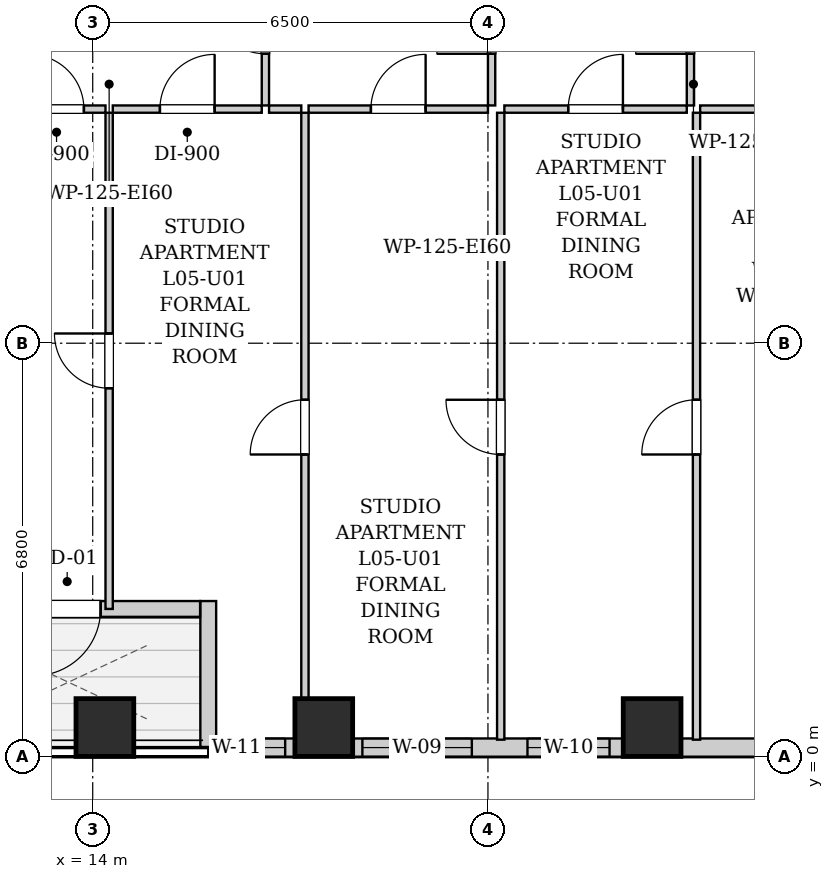
"""IFC4 building model, lengths in metres.
Left out: names, types, materials, properties, quantities, classifications, styles, units other than length and angle.
Written with IfcOpenShell. Run it as: python <this file> out.ifc"""

import sys

from ifc_helpers import new_model, si_unit, direction, frame, frame_2d, origin, origin_2d, place, context, subcontext, project, spatial, rectangle, extrude, element, fill, save


model = new_model("IFC4")
c1 = context("Model", 3, precision=1e-05, world=origin(), true_north=direction((0.0, 1.0)))
c2 = subcontext(c1, "Body", "Model", "MODEL_VIEW")
j1 = project(units=[si_unit("LENGTHUNIT", "METRE"), si_unit("PLANEANGLEUNIT", "RADIAN")], contexts=[c1])
p1 = place(None, origin())
s1 = spatial("IfcSite", under=j1, at=p1, CompositionType="ELEMENT")
p2 = place(p1, origin())
s2 = spatial("IfcBuilding", under=s1, at=p2, CompositionType="ELEMENT")
p3 = place(p2, frame((0.0, 0.0, 25.8)))
s3 = spatial("IfcBuildingStorey", under=s2, at=p3, CompositionType="ELEMENT", Elevation=25.8)
for number, where, z_axis, x_axis in (
    (1, (14.2, 0.48, 0.0), (0.0, 0.0, 1.0), (1.0, 0.0, 0.0)),
    (2, (17.8, 0.48, 0.0), (0.0, 0.0, 1.0), (1.0, 0.0, 0.0)),
    (3, (23.2, 0.48, 0.0), (0.0, 0.0, 1.0), (1.0, 0.0, 0.0)),
):
    element("IfcColumn", number, at=place(p3, frame(where, z_axis=z_axis, x_axis=x_axis)), inside=s3, PredefinedType="COLUMN", context=c2, shape_type="SweptSolid", body=[
        extrude(rectangle(XDim=0.95, YDim=0.95, at=origin_2d()), origin(), (0.0, 0.0, 1.0), 3.2),
    ])
p4 = place(p3, frame((44.0, 0.15, 0.0), z_axis=(0.0, 0.0, 1.0), x_axis=(-1.0, 0.0, 0.0)))
e4 = element("IfcWall", 4, at=p4, inside=s3, PredefinedType="SOLIDWALL", context=c2, shape_type="SweptSolid", body=[
    extrude(rectangle(XDim=28.1, YDim=0.3, at=frame_2d((14.05, 0.0))), origin(), (0.0, 0.0, 1.0), 1.975),
])
p5 = place(p4, frame((26.835, 0.0, 0.55)))
e5 = element("IfcOpeningElement", 5, at=p5, cuts=e4, PredefinedType="OPENING", context=c2, shape_type="SweptSolid", body=[
    extrude(rectangle(XDim=0.85, YDim=1.2, at=frame_2d((0.425, 0.6))), frame((0.0, 0.16, 0.0), z_axis=(0.0, -1.0, 0.0), x_axis=(1.0, 0.0, 0.0)), (0.0, 0.0, 1.0), 0.32),
])
p6 = place(p4, frame((23.765, 0.0, 0.55)))
e6 = element("IfcOpeningElement", 6, at=p6, cuts=e4, PredefinedType="OPENING", context=c2, shape_type="SweptSolid", body=[
    extrude(rectangle(XDim=1.8, YDim=1.2, at=frame_2d((0.9, 0.6))), frame((0.0, 0.16, 0.0), z_axis=(0.0, -1.0, 0.0), x_axis=(1.0, 0.0, 0.0)), (0.0, 0.0, 1.0), 0.32),
])
p7 = place(p4, frame((21.5, 0.0, 0.55)))
e7 = element("IfcOpeningElement", 7, at=p7, cuts=e4, PredefinedType="OPENING", context=c2, shape_type="SweptSolid", body=[
    extrude(rectangle(XDim=1.35, YDim=1.2, at=frame_2d((0.675, 0.6))), frame((0.0, 0.16, 0.0), z_axis=(0.0, -1.0, 0.0), x_axis=(1.0, 0.0, 0.0)), (0.0, 0.0, 1.0), 0.32),
])
p8 = place(p4, frame((14.352, 0.0, 0.55)))
e8 = element("IfcOpeningElement", 8, at=p8, cuts=e4, PredefinedType="OPENING", context=c2, shape_type="SweptSolid", body=[
    extrude(rectangle(XDim=1.8, YDim=1.2, at=frame_2d((0.9, 0.6))), frame((0.0, 0.16, 0.0), z_axis=(0.0, -1.0, 0.0), x_axis=(1.0, 0.0, 0.0)), (0.0, 0.0, 1.0), 0.32),
])
p9 = place(p4, frame((11.435, 0.0, 0.55)))
e9 = element("IfcOpeningElement", 9, at=p9, cuts=e4, PredefinedType="OPENING", context=c2, shape_type="SweptSolid", body=[
    extrude(rectangle(XDim=1.8, YDim=1.2, at=frame_2d((0.9, 0.6))), frame((0.0, 0.16, 0.0), z_axis=(0.0, -1.0, 0.0), x_axis=(1.0, 0.0, 0.0)), (0.0, 0.0, 1.0), 0.32),
])
p10 = place(p4, frame((7.891, 0.0, 0.55)))
e10 = element("IfcOpeningElement", 10, at=p10, cuts=e4, PredefinedType="OPENING", context=c2, shape_type="SweptSolid", body=[
    extrude(rectangle(XDim=1.8, YDim=1.2, at=frame_2d((0.9, 0.6))), frame((0.0, 0.16, 0.0), z_axis=(0.0, -1.0, 0.0), x_axis=(1.0, 0.0, 0.0)), (0.0, 0.0, 1.0), 0.32),
])
p11 = place(p4, frame((4.315, 0.0, 0.55)))
e11 = element("IfcOpeningElement", 11, at=p11, cuts=e4, PredefinedType="OPENING", context=c2, shape_type="SweptSolid", body=[
    extrude(rectangle(XDim=0.85, YDim=1.2, at=frame_2d((0.425, 0.6))), frame((0.0, 0.16, 0.0), z_axis=(0.0, -1.0, 0.0), x_axis=(1.0, 0.0, 0.0)), (0.0, 0.0, 1.0), 0.32),
])
p12 = place(p3, frame((15.9, 0.16, 0.0), z_axis=(0.0, 0.0, 1.0), x_axis=(0.0, 1.0, 0.0)))
e12 = element("IfcWall", 12, at=p12, inside=s3, PredefinedType="SOLIDWALL", context=c2, shape_type="SweptSolid", body=[
    extrude(rectangle(XDim=2.4, YDim=0.26, at=frame_2d((1.2, 0.0))), origin(), (0.0, 0.0, 1.0), 2.94),
])
p13 = place(p3, frame((15.766, 2.43, 0.0), z_axis=(0.0, 0.0, 1.0), x_axis=(-1.0, 0.0, 0.0)))
e13 = element("IfcWall", 13, at=p13, inside=s3, PredefinedType="SOLIDWALL", context=c2, shape_type="SweptSolid", body=[
    extrude(rectangle(XDim=4.332, YDim=0.26, at=frame_2d((2.166, 0.0))), origin(), (0.0, 0.0, 1.0), 2.94),
])
p14 = place(p13, frame((1.636, 0.0, 0.0)))
e14 = element("IfcOpeningElement", 14, at=p14, cuts=e13, PredefinedType="OPENING", context=c2, shape_type="SweptSolid", body=[
    extrude(rectangle(XDim=1.1, YDim=2.0, at=frame_2d((0.55, 1.0))), frame((0.0, 0.14, 0.0), z_axis=(0.0, -1.0, 0.0), x_axis=(1.0, 0.0, 0.0)), (0.0, 0.0, 1.0), 0.28),
])
p15 = place(p13, frame((2.896, 0.0, 0.55)))
e15 = element("IfcOpeningElement", 15, at=p15, cuts=e13, PredefinedType="OPENING", context=c2, shape_type="SweptSolid", body=[
    extrude(rectangle(XDim=0.85, YDim=1.2, at=frame_2d((0.425, 0.6))), frame((0.0, 0.14, 0.0), z_axis=(0.0, -1.0, 0.0), x_axis=(1.0, 0.0, 0.0)), (0.0, 0.0, 1.0), 0.28),
])
p16 = place(p3, frame((16.84, 10.71, 0.0), z_axis=(0.0, 0.0, 1.0), x_axis=(0.0, 1.0, 0.0)))
e16 = element("IfcWall", 16, at=p16, inside=s3, PredefinedType="PARTITIONING", context=c2, shape_type="SweptSolid", body=[
    extrude(rectangle(XDim=2.6, YDim=0.12, at=frame_2d((1.3, 0.0))), origin(), (0.0, 0.0, 1.0), 2.94),
])
p17 = place(p16, frame((0.85, 0.0, 0.0)))
e17 = element("IfcOpeningElement", 17, at=p17, cuts=e16, PredefinedType="OPENING", context=c2, shape_type="SweptSolid", body=[
    extrude(rectangle(XDim=0.9, YDim=2.05, at=frame_2d((0.45, 1.025))), frame((0.0, 0.07, 0.0), z_axis=(0.0, -1.0, 0.0), x_axis=(1.0, 0.0, 0.0)), (0.0, 0.0, 1.0), 0.14),
])
p18 = place(p3, frame((12.6, 10.65, 0.0), z_axis=(0.0, 0.0, 1.0), x_axis=(1.0, 0.0, 0.0)))
e18 = element("IfcWall", 18, at=p18, inside=s3, PredefinedType="PARTITIONING", context=c2, shape_type="SweptSolid", body=[
    extrude(rectangle(XDim=1.61, YDim=0.12, at=frame_2d((0.805, 0.0))), origin(), (0.0, 0.0, 1.0), 2.94),
])
p19 = place(p18, frame((0.355, 0.0, 0.0)))
e19 = element("IfcOpeningElement", 19, at=p19, cuts=e18, PredefinedType="OPENING", context=c2, shape_type="SweptSolid", body=[
    extrude(rectangle(XDim=0.9, YDim=2.05, at=frame_2d((0.45, 1.025))), frame((0.0, 0.07, 0.0), z_axis=(0.0, -1.0, 0.0), x_axis=(1.0, 0.0, 0.0)), (0.0, 0.0, 1.0), 0.14),
])
p20 = place(p3, frame((14.33, 10.65, 0.0), z_axis=(0.0, 0.0, 1.0), x_axis=(1.0, 0.0, 0.0)))
e20 = element("IfcWall", 20, at=p20, inside=s3, PredefinedType="PARTITIONING", context=c2, shape_type="SweptSolid", body=[
    extrude(rectangle(XDim=2.45, YDim=0.12, at=frame_2d((1.225, 0.0))), origin(), (0.0, 0.0, 1.0), 2.94),
])
p21 = place(p20, frame((0.775, 0.0, 0.0)))
e21 = element("IfcOpeningElement", 21, at=p21, cuts=e20, PredefinedType="OPENING", context=c2, shape_type="SweptSolid", body=[
    extrude(rectangle(XDim=0.9, YDim=2.05, at=frame_2d((0.45, 1.025))), frame((0.0, 0.07, 0.0), z_axis=(0.0, -1.0, 0.0), x_axis=(1.0, 0.0, 0.0)), (0.0, 0.0, 1.0), 0.14),
])
p22 = place(p3, frame((20.56, 10.71, 0.0), z_axis=(0.0, 0.0, 1.0), x_axis=(0.0, 1.0, 0.0)))
e22 = element("IfcWall", 22, at=p22, inside=s3, PredefinedType="PARTITIONING", context=c2, shape_type="SweptSolid", body=[
    extrude(rectangle(XDim=2.6, YDim=0.12, at=frame_2d((1.3, 0.0))), origin(), (0.0, 0.0, 1.0), 2.94),
])
p23 = place(p22, frame((0.85, 0.0, 0.0)))
e23 = element("IfcOpeningElement", 23, at=p23, cuts=e22, PredefinedType="OPENING", context=c2, shape_type="SweptSolid", body=[
    extrude(rectangle(XDim=0.9, YDim=2.05, at=frame_2d((0.45, 1.025))), frame((0.0, 0.07, 0.0), z_axis=(0.0, -1.0, 0.0), x_axis=(1.0, 0.0, 0.0)), (0.0, 0.0, 1.0), 0.14),
])
p24 = place(p3, frame((16.9, 10.65, 0.0), z_axis=(0.0, 0.0, 1.0), x_axis=(1.0, 0.0, 0.0)))
e24 = element("IfcWall", 24, at=p24, inside=s3, PredefinedType="PARTITIONING", context=c2, shape_type="SweptSolid", body=[
    extrude(rectangle(XDim=0.53, YDim=0.12, at=frame_2d((0.265, 0.0))), origin(), (0.0, 0.0, 1.0), 2.94),
])
p25 = place(p3, frame((17.55, 10.65, 0.0), z_axis=(0.0, 0.0, 1.0), x_axis=(1.0, 0.0, 0.0)))
e25 = element("IfcWall", 25, at=p25, inside=s3, PredefinedType="PARTITIONING", context=c2, shape_type="SweptSolid", body=[
    extrude(rectangle(XDim=2.95, YDim=0.12, at=frame_2d((1.475, 0.0))), origin(), (0.0, 0.0, 1.0), 2.94),
])
p26 = place(p25, frame((1.025, 0.0, 0.0)))
e26 = element("IfcOpeningElement", 26, at=p26, cuts=e25, PredefinedType="OPENING", context=c2, shape_type="SweptSolid", body=[
    extrude(rectangle(XDim=0.9, YDim=2.05, at=frame_2d((0.45, 1.025))), frame((0.0, 0.07, 0.0), z_axis=(0.0, -1.0, 0.0), x_axis=(1.0, 0.0, 0.0)), (0.0, 0.0, 1.0), 0.14),
])
p27 = place(p3, frame((23.83, 10.71, 0.0), z_axis=(0.0, 0.0, 1.0), x_axis=(0.0, 1.0, 0.0)))
e27 = element("IfcWall", 27, at=p27, inside=s3, PredefinedType="PARTITIONING", context=c2, shape_type="SweptSolid", body=[
    extrude(rectangle(XDim=2.6, YDim=0.12, at=frame_2d((1.3, 0.0))), origin(), (0.0, 0.0, 1.0), 2.94),
])
p28 = place(p27, frame((0.85, 0.0, 0.0)))
e28 = element("IfcOpeningElement", 28, at=p28, cuts=e27, PredefinedType="OPENING", context=c2, shape_type="SweptSolid", body=[
    extrude(rectangle(XDim=0.9, YDim=2.05, at=frame_2d((0.45, 1.025))), frame((0.0, 0.07, 0.0), z_axis=(0.0, -1.0, 0.0), x_axis=(1.0, 0.0, 0.0)), (0.0, 0.0, 1.0), 0.14),
])
p29 = place(p3, frame((20.77, 10.65, 0.0), z_axis=(0.0, 0.0, 1.0), x_axis=(1.0, 0.0, 0.0)))
e29 = element("IfcWall", 29, at=p29, inside=s3, PredefinedType="PARTITIONING", context=c2, shape_type="SweptSolid", body=[
    extrude(rectangle(XDim=3.0, YDim=0.12, at=frame_2d((1.5, 0.0))), origin(), (0.0, 0.0, 1.0), 2.94),
])
p30 = place(p29, frame((1.05, 0.0, 0.0)))
e30 = element("IfcOpeningElement", 30, at=p30, cuts=e29, PredefinedType="OPENING", context=c2, shape_type="SweptSolid", body=[
    extrude(rectangle(XDim=0.9, YDim=2.05, at=frame_2d((0.45, 1.025))), frame((0.0, 0.07, 0.0), z_axis=(0.0, -1.0, 0.0), x_axis=(1.0, 0.0, 0.0)), (0.0, 0.0, 1.0), 0.14),
])
p31 = place(p3, frame((23.99, 10.65, 0.0), z_axis=(0.0, 0.0, 1.0), x_axis=(1.0, 0.0, 0.0)))
e31 = element("IfcWall", 31, at=p31, inside=s3, PredefinedType="PARTITIONING", context=c2, shape_type="SweptSolid", body=[
    extrude(rectangle(XDim=3.1, YDim=0.12, at=frame_2d((1.55, 0.0))), origin(), (0.0, 0.0, 1.0), 2.94),
])
p32 = place(p31, frame((1.1, 0.0, 0.0)))
e32 = element("IfcOpeningElement", 32, at=p32, cuts=e31, PredefinedType="OPENING", context=c2, shape_type="SweptSolid", body=[
    extrude(rectangle(XDim=0.9, YDim=2.05, at=frame_2d((0.45, 1.025))), frame((0.0, 0.07, 0.0), z_axis=(0.0, -1.0, 0.0), x_axis=(1.0, 0.0, 0.0)), (0.0, 0.0, 1.0), 0.14),
])
p33 = place(p3, frame((14.27, 2.43, 0.0), z_axis=(0.0, 0.0, 1.0), x_axis=(0.0, 1.0, 0.0)))
e33 = element("IfcWall", 33, at=p33, inside=s3, PredefinedType="PARTITIONING", context=c2, shape_type="SweptSolid", body=[
    extrude(rectangle(XDim=8.16, YDim=0.12, at=frame_2d((4.08, 0.0))), origin(), (0.0, 0.0, 1.0), 2.94),
])
p34 = place(p33, frame((3.63, 0.0, 0.0)))
e34 = element("IfcOpeningElement", 34, at=p34, cuts=e33, PredefinedType="OPENING", context=c2, shape_type="SweptSolid", body=[
    extrude(rectangle(XDim=0.9, YDim=2.05, at=frame_2d((0.45, 1.025))), frame((0.0, 0.07, 0.0), z_axis=(0.0, -1.0, 0.0), x_axis=(1.0, 0.0, 0.0)), (0.0, 0.0, 1.0), 0.14),
])
p35 = place(p3, frame((17.49, 0.28, 0.0), z_axis=(0.0, 0.0, 1.0), x_axis=(0.0, 1.0, 0.0)))
e35 = element("IfcWall", 35, at=p35, inside=s3, PredefinedType="PARTITIONING", context=c2, shape_type="SweptSolid", body=[
    extrude(rectangle(XDim=10.31, YDim=0.12, at=frame_2d((5.155, 0.0))), origin(), (0.0, 0.0, 1.0), 2.94),
])
p36 = place(p35, frame((4.69, 0.0, 0.0)))
e36 = element("IfcOpeningElement", 36, at=p36, cuts=e35, PredefinedType="OPENING", context=c2, shape_type="SweptSolid", body=[
    extrude(rectangle(XDim=0.9, YDim=2.05, at=frame_2d((0.45, 1.025))), frame((0.0, 0.07, 0.0), z_axis=(0.0, -1.0, 0.0), x_axis=(1.0, 0.0, 0.0)), (0.0, 0.0, 1.0), 0.14),
])
p37 = place(p3, frame((20.71, 0.28, 0.0), z_axis=(0.0, 0.0, 1.0), x_axis=(0.0, 1.0, 0.0)))
e37 = element("IfcWall", 37, at=p37, inside=s3, PredefinedType="PARTITIONING", context=c2, shape_type="SweptSolid", body=[
    extrude(rectangle(XDim=10.31, YDim=0.12, at=frame_2d((5.155, 0.0))), origin(), (0.0, 0.0, 1.0), 2.94),
])
p38 = place(p37, frame((4.69, 0.0, 0.0)))
e38 = element("IfcOpeningElement", 38, at=p38, cuts=e37, PredefinedType="OPENING", context=c2, shape_type="SweptSolid", body=[
    extrude(rectangle(XDim=0.9, YDim=2.05, at=frame_2d((0.45, 1.025))), frame((0.0, 0.07, 0.0), z_axis=(0.0, -1.0, 0.0), x_axis=(1.0, 0.0, 0.0)), (0.0, 0.0, 1.0), 0.14),
])
p39 = place(p3, frame((23.93, 0.28, 0.0), z_axis=(0.0, 0.0, 1.0), x_axis=(0.0, 1.0, 0.0)))
e39 = element("IfcWall", 39, at=p39, inside=s3, PredefinedType="PARTITIONING", context=c2, shape_type="SweptSolid", body=[
    extrude(rectangle(XDim=10.31, YDim=0.12, at=frame_2d((5.155, 0.0))), origin(), (0.0, 0.0, 1.0), 2.94),
])
p40 = place(p39, frame((4.69, 0.0, 0.0)))
e40 = element("IfcOpeningElement", 40, at=p40, cuts=e39, PredefinedType="OPENING", context=c2, shape_type="SweptSolid", body=[
    extrude(rectangle(XDim=0.9, YDim=2.05, at=frame_2d((0.45, 1.025))), frame((0.0, 0.07, 0.0), z_axis=(0.0, -1.0, 0.0), x_axis=(1.0, 0.0, 0.0)), (0.0, 0.0, 1.0), 0.14),
])
p41 = place(p17, origin())
e41 = element("IfcDoor", 41, at=p41, inside=s3, OperationType="SINGLE_SWING_RIGHT", PredefinedType="DOOR", context=c2, shape_type="SweptSolid", body=[
    extrude(rectangle(XDim=0.9, YDim=2.05, at=frame_2d((0.45, 1.025))), frame((0.0, 0.025, 0.0), z_axis=(0.0, -1.0, 0.0), x_axis=(1.0, 0.0, 0.0)), (0.0, 0.0, 1.0), 0.05),
])
fill(e17, e41)
p42 = place(p19, origin())
e42 = element("IfcDoor", 42, at=p42, inside=s3, OperationType="SINGLE_SWING_LEFT", PredefinedType="DOOR", context=c2, shape_type="SweptSolid", body=[
    extrude(rectangle(XDim=0.9, YDim=2.05, at=frame_2d((0.45, 1.025))), frame((0.0, 0.025, 0.0), z_axis=(0.0, -1.0, 0.0), x_axis=(1.0, 0.0, 0.0)), (0.0, 0.0, 1.0), 0.05),
])
fill(e19, e42)
p43 = place(p21, origin())
e43 = element("IfcDoor", 43, at=p43, inside=s3, OperationType="SINGLE_SWING_RIGHT", PredefinedType="DOOR", context=c2, shape_type="SweptSolid", body=[
    extrude(rectangle(XDim=0.9, YDim=2.05, at=frame_2d((0.45, 1.025))), frame((0.0, 0.025, 0.0), z_axis=(0.0, -1.0, 0.0), x_axis=(1.0, 0.0, 0.0)), (0.0, 0.0, 1.0), 0.05),
])
fill(e21, e43)
p44 = place(p23, origin())
e44 = element("IfcDoor", 44, at=p44, inside=s3, OperationType="SINGLE_SWING_LEFT", PredefinedType="DOOR", context=c2, shape_type="SweptSolid", body=[
    extrude(rectangle(XDim=0.9, YDim=2.05, at=frame_2d((0.45, 1.025))), frame((0.0, 0.025, 0.0), z_axis=(0.0, -1.0, 0.0), x_axis=(1.0, 0.0, 0.0)), (0.0, 0.0, 1.0), 0.05),
])
fill(e23, e44)
p45 = place(p26, origin())
e45 = element("IfcDoor", 45, at=p45, inside=s3, OperationType="SINGLE_SWING_RIGHT", PredefinedType="DOOR", context=c2, shape_type="SweptSolid", body=[
    extrude(rectangle(XDim=0.9, YDim=2.05, at=frame_2d((0.45, 1.025))), frame((0.0, 0.025, 0.0), z_axis=(0.0, -1.0, 0.0), x_axis=(1.0, 0.0, 0.0)), (0.0, 0.0, 1.0), 0.05),
])
fill(e26, e45)
p46 = place(p28, origin())
e46 = element("IfcDoor", 46, at=p46, inside=s3, OperationType="SINGLE_SWING_LEFT", PredefinedType="DOOR", context=c2, shape_type="SweptSolid", body=[
    extrude(rectangle(XDim=0.9, YDim=2.05, at=frame_2d((0.45, 1.025))), frame((0.0, 0.025, 0.0), z_axis=(0.0, -1.0, 0.0), x_axis=(1.0, 0.0, 0.0)), (0.0, 0.0, 1.0), 0.05),
])
fill(e28, e46)
p47 = place(p30, origin())
e47 = element("IfcDoor", 47, at=p47, inside=s3, OperationType="SINGLE_SWING_RIGHT", PredefinedType="DOOR", context=c2, shape_type="SweptSolid", body=[
    extrude(rectangle(XDim=0.9, YDim=2.05, at=frame_2d((0.45, 1.025))), frame((0.0, 0.025, 0.0), z_axis=(0.0, -1.0, 0.0), x_axis=(1.0, 0.0, 0.0)), (0.0, 0.0, 1.0), 0.05),
])
fill(e30, e47)
p48 = place(p34, origin())
e48 = element("IfcDoor", 48, at=p48, inside=s3, OperationType="SINGLE_SWING_RIGHT", PredefinedType="DOOR", context=c2, shape_type="SweptSolid", body=[
    extrude(rectangle(XDim=0.9, YDim=2.05, at=frame_2d((0.45, 1.025))), frame((0.0, 0.025, 0.0), z_axis=(0.0, -1.0, 0.0), x_axis=(1.0, 0.0, 0.0)), (0.0, 0.0, 1.0), 0.05),
])
fill(e34, e48)
p49 = place(p36, origin())
e49 = element("IfcDoor", 49, at=p49, inside=s3, OperationType="SINGLE_SWING_LEFT", PredefinedType="DOOR", context=c2, shape_type="SweptSolid", body=[
    extrude(rectangle(XDim=0.9, YDim=2.05, at=frame_2d((0.45, 1.025))), frame((0.0, 0.025, 0.0), z_axis=(0.0, -1.0, 0.0), x_axis=(1.0, 0.0, 0.0)), (0.0, 0.0, 1.0), 0.05),
])
fill(e36, e49)
p50 = place(p38, origin())
e50 = element("IfcDoor", 50, at=p50, inside=s3, OperationType="SINGLE_SWING_RIGHT", PredefinedType="DOOR", context=c2, shape_type="SweptSolid", body=[
    extrude(rectangle(XDim=0.9, YDim=2.05, at=frame_2d((0.45, 1.025))), frame((0.0, 0.025, 0.0), z_axis=(0.0, -1.0, 0.0), x_axis=(1.0, 0.0, 0.0)), (0.0, 0.0, 1.0), 0.05),
])
fill(e38, e50)
p51 = place(p40, origin())
e51 = element("IfcDoor", 51, at=p51, inside=s3, OperationType="SINGLE_SWING_LEFT", PredefinedType="DOOR", context=c2, shape_type="SweptSolid", body=[
    extrude(rectangle(XDim=0.9, YDim=2.05, at=frame_2d((0.45, 1.025))), frame((0.0, 0.025, 0.0), z_axis=(0.0, -1.0, 0.0), x_axis=(1.0, 0.0, 0.0)), (0.0, 0.0, 1.0), 0.05),
])
fill(e40, e51)
p52 = place(p14, origin())
e52 = element("IfcDoor", 52, at=p52, inside=s3, OperationType="SINGLE_SWING_RIGHT", PredefinedType="DOOR", context=c2, shape_type="SweptSolid", body=[
    extrude(rectangle(XDim=1.1, YDim=2.0, at=frame_2d((0.55, 1.0))), frame((0.0, 0.025, 0.0), z_axis=(0.0, -1.0, 0.0), x_axis=(1.0, 0.0, 0.0)), (0.0, 0.0, 1.0), 0.05),
])
fill(e14, e52)
p53 = place(p5, origin())
e53 = element("IfcWindow", 53, at=p53, inside=s3, PartitioningType="SINGLE_PANEL", PredefinedType="WINDOW", context=c2, shape_type="SweptSolid", body=[
    extrude(rectangle(XDim=0.85, YDim=1.2, at=frame_2d((0.425, 0.6))), frame((0.0, 0.03, 0.0), z_axis=(0.0, -1.0, 0.0), x_axis=(1.0, 0.0, 0.0)), (0.0, 0.0, 1.0), 0.06),
])
fill(e5, e53)
p54 = place(p6, origin())
e54 = element("IfcWindow", 54, at=p54, inside=s3, PartitioningType="DOUBLE_PANEL_VERTICAL", PredefinedType="WINDOW", context=c2, shape_type="SweptSolid", body=[
    extrude(rectangle(XDim=1.8, YDim=1.2, at=frame_2d((0.9, 0.6))), frame((0.0, 0.03, 0.0), z_axis=(0.0, -1.0, 0.0), x_axis=(1.0, 0.0, 0.0)), (0.0, 0.0, 1.0), 0.06),
])
fill(e6, e54)
p55 = place(p7, origin())
e55 = element("IfcWindow", 55, at=p55, inside=s3, PartitioningType="SINGLE_PANEL", PredefinedType="WINDOW", context=c2, shape_type="SweptSolid", body=[
    extrude(rectangle(XDim=1.35, YDim=1.2, at=frame_2d((0.675, 0.6))), frame((0.0, 0.03, 0.0), z_axis=(0.0, -1.0, 0.0), x_axis=(1.0, 0.0, 0.0)), (0.0, 0.0, 1.0), 0.06),
])
fill(e7, e55)
save(model, sys.argv[1])
